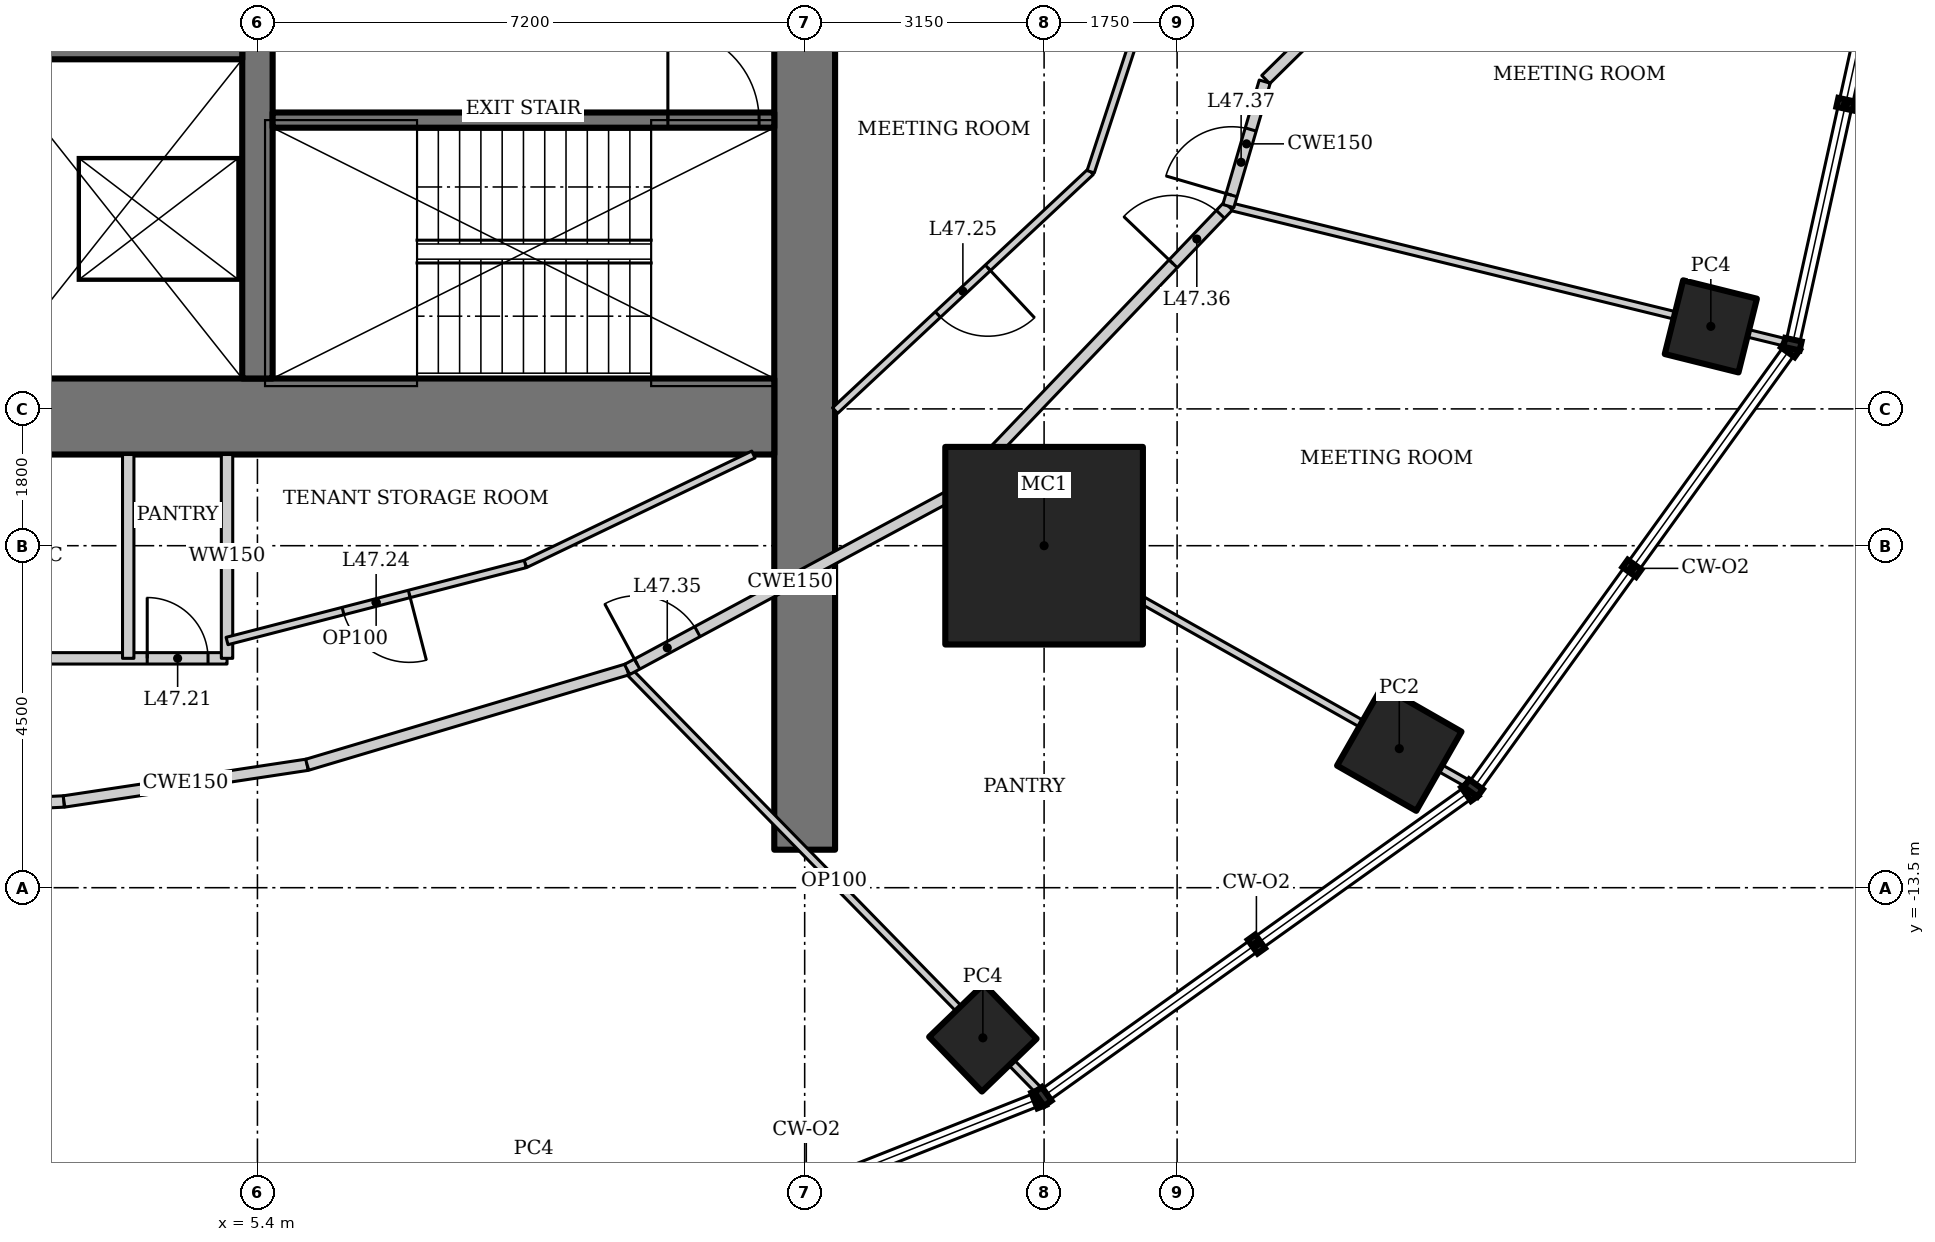
"""IFC4 building model, lengths in metres.
Left out: names, types, materials, properties, quantities, classifications, styles, units other than length and angle.
Written with IfcOpenShell. Run it as: python <this file> out.ifc"""

import sys

from ifc_helpers import new_model, si_unit, direction, frame, frame_2d, origin, origin_2d, place, context, subcontext, project, spatial, rectangle, hollow_rectangle, extrude, element, fill, save


model = new_model("IFC4")
c1 = context("Model", 3, precision=1e-05, world=origin(), true_north=direction((0.0, 1.0)))
c2 = subcontext(c1, "Body", "Model", "MODEL_VIEW")
j1 = project(units=[si_unit("LENGTHUNIT", "METRE"), si_unit("PLANEANGLEUNIT", "RADIAN")], contexts=[c1])
p1 = place(None, origin())
s1 = spatial("IfcSite", under=j1, at=p1, CompositionType="ELEMENT")
p2 = place(p1, origin())
s2 = spatial("IfcBuilding", under=s1, at=p2, CompositionType="ELEMENT")
p3 = place(p2, frame((0.0, 0.0, 203.2)))
s3 = spatial("IfcBuildingStorey", under=s2, at=p3, CompositionType="ELEMENT", Elevation=203.2)
p4 = place(p3, frame((15.75, -9.0, 0.0), z_axis=(0.0, 0.0, 1.0), x_axis=(1.0, 0.0, 0.0)))
e1 = element("IfcColumn", 1, at=p4, inside=s3, PredefinedType="COLUMN", context=c2, shape_type="SweptSolid", body=[
    extrude(hollow_rectangle(XDim=2.6, YDim=2.6, WallThickness=0.13, at=origin_2d()), origin(), (0.0, 0.0, 1.0), 4.2),
])
for number, where, z_axis, x_axis in (
    (2, (9.035, -17.731, 0.0), (0.0, 0.0, 1.0), (0.891, 0.454, 0.0)),
    (3, (14.944, -15.475, 0.0), (0.0, 0.0, 1.0), (0.719, 0.695, 0.0)),
):
    element("IfcColumn", number, at=place(p3, frame(where, z_axis=z_axis, x_axis=x_axis)), inside=s3, PredefinedType="COLUMN", context=c2, shape_type="SweptSolid", body=[
        extrude(hollow_rectangle(XDim=1.0, YDim=1.0, WallThickness=0.08, at=origin_2d()), origin(), (0.0, 0.0, 1.0), 4.2),
    ])
p5 = place(p3, frame((20.423, -11.67, 0.0), z_axis=(0.0, 0.0, 1.0), x_axis=(0.496139221777, 0.86824298017, 0.0)))
e4 = element("IfcColumn", 4, at=p5, inside=s3, PredefinedType="COLUMN", context=c2, shape_type="SweptSolid", body=[
    extrude(hollow_rectangle(XDim=1.2, YDim=1.2, WallThickness=0.1, at=origin_2d()), origin(), (0.0, 0.0, 1.0), 4.2),
])
p6 = place(p3, frame((24.522, -6.114, 0.0), z_axis=(0.0, 0.0, 1.0), x_axis=(0.2419218956, 0.970295726276, 0.0)))
e5 = element("IfcColumn", 5, at=p6, inside=s3, PredefinedType="COLUMN", context=c2, shape_type="SweptSolid", body=[
    extrude(hollow_rectangle(XDim=1.0, YDim=1.0, WallThickness=0.08, at=origin_2d()), origin(), (0.0, 0.0, 1.0), 4.2),
])
p7 = place(p3, frame((12.6, -13.0, 0.0), z_axis=(0.0, 0.0, 1.0), x_axis=(0.0, 1.0, 0.0)))
e6 = element("IfcWall", 6, at=p7, inside=s3, PredefinedType="SHEAR", context=c2, shape_type="SweptSolid", body=[
    extrude(rectangle(XDim=26.0, YDim=0.8, at=frame_2d((13.0, 0.0))), origin(), (0.0, 0.0, 1.0), 4.2),
])
p8 = place(p7, frame((12.1, 0.0, 0.0)))
e7 = element("IfcOpeningElement", 7, at=p8, cuts=e6, PredefinedType="OPENING", context=c2, shape_type="SweptSolid", body=[
    extrude(rectangle(XDim=1.8, YDim=2.1, at=frame_2d((0.9, 1.05))), frame((0.0, 0.41, 0.0), z_axis=(0.0, -1.0, 0.0), x_axis=(1.0, 0.0, 0.0)), (0.0, 0.0, 1.0), 0.82),
])
p9 = place(p3, frame((-12.2, -7.3, 0.0), z_axis=(0.0, 0.0, 1.0), x_axis=(1.0, 0.0, 0.0)))
e8 = element("IfcWall", 8, at=p9, inside=s3, PredefinedType="SHEAR", context=c2, shape_type="SweptSolid", body=[
    extrude(rectangle(XDim=24.4, YDim=1.0, at=frame_2d((12.2, 0.0))), origin(), (0.0, 0.0, 1.0), 4.2),
])
p10 = place(p3, frame((5.4, -6.8, 0.0), z_axis=(0.0, 0.0, 1.0), x_axis=(0.0, 1.0, 0.0)))
e9 = element("IfcWall", 9, at=p10, inside=s3, PredefinedType="SHEAR", context=c2, shape_type="SweptSolid", body=[
    extrude(rectangle(XDim=14.6, YDim=0.4, at=frame_2d((7.3, 0.0))), origin(), (0.0, 0.0, 1.0), 4.2),
])
p11 = place(p10, frame((5.9, 0.0, 0.0)))
e10 = element("IfcOpeningElement", 10, at=p11, cuts=e9, PredefinedType="OPENING", context=c2, shape_type="SweptSolid", body=[
    extrude(rectangle(XDim=1.8, YDim=2.1, at=frame_2d((0.9, 1.05))), frame((0.0, 0.21, 0.0), z_axis=(0.0, -1.0, 0.0), x_axis=(1.0, 0.0, 0.0)), (0.0, 0.0, 1.0), 0.42),
])
p12 = place(p3, frame((-5.2, -2.4, 0.0), z_axis=(0.0, 0.0, 1.0), x_axis=(1.0, 0.0, 0.0)))
e11 = element("IfcWall", 11, at=p12, inside=s3, PredefinedType="SHEAR", context=c2, shape_type="SweptSolid", body=[
    extrude(rectangle(XDim=10.4, YDim=0.4, at=frame_2d((5.2, 0.0))), origin(), (0.0, 0.0, 1.0), 4.2),
])
p13 = place(p12, frame((1.683, 0.0, 0.0)))
e12 = element("IfcOpeningElement", 12, at=p13, cuts=e11, PredefinedType="OPENING", context=c2, shape_type="SweptSolid", body=[
    extrude(rectangle(XDim=1.1, YDim=2.2, at=frame_2d((0.55, 1.1))), frame((0.0, 0.21, 0.0), z_axis=(0.0, -1.0, 0.0), x_axis=(1.0, 0.0, 0.0)), (0.0, 0.0, 1.0), 0.42),
])
p14 = place(p12, frame((5.217, 0.0, 0.0)))
e13 = element("IfcOpeningElement", 13, at=p14, cuts=e11, PredefinedType="OPENING", context=c2, shape_type="SweptSolid", body=[
    extrude(rectangle(XDim=1.1, YDim=2.2, at=frame_2d((0.55, 1.1))), frame((0.0, 0.21, 0.0), z_axis=(0.0, -1.0, 0.0), x_axis=(1.0, 0.0, 0.0)), (0.0, 0.0, 1.0), 0.42),
])
p15 = place(p12, frame((8.75, 0.0, 0.0)))
e14 = element("IfcOpeningElement", 14, at=p15, cuts=e11, PredefinedType="OPENING", context=c2, shape_type="SweptSolid", body=[
    extrude(rectangle(XDim=1.1, YDim=2.2, at=frame_2d((0.55, 1.1))), frame((0.0, 0.21, 0.0), z_axis=(0.0, -1.0, 0.0), x_axis=(1.0, 0.0, 0.0)), (0.0, 0.0, 1.0), 0.42),
])
p16 = place(p3, frame((5.6, -3.4, 0.0), z_axis=(0.0, 0.0, 1.0), x_axis=(1.0, 0.0, 0.0)))
e15 = element("IfcWall", 15, at=p16, inside=s3, PredefinedType="SHEAR", context=c2, shape_type="SweptSolid", body=[
    extrude(rectangle(XDim=6.6, YDim=0.2, at=frame_2d((3.3, 0.0))), origin(), (0.0, 0.0, 1.0), 4.2),
])
p17 = place(p16, frame((5.2, 0.0, 0.0)))
e16 = element("IfcOpeningElement", 16, at=p17, cuts=e15, PredefinedType="OPENING", context=c2, shape_type="SweptSolid", body=[
    extrude(rectangle(XDim=1.2, YDim=2.1, at=frame_2d((0.6, 1.05))), frame((0.0, 0.11, 0.0), z_axis=(0.0, -1.0, 0.0), x_axis=(1.0, 0.0, 0.0)), (0.0, 0.0, 1.0), 0.22),
])
p18 = place(p3, frame((15.709, -16.199, 0.0), z_axis=(0.0, 0.0, 1.0), x_axis=(-0.699053895446, 0.715068983569, 0.0)))
e17 = element("IfcWall", 17, at=p18, inside=s3, PredefinedType="PARTITIONING", context=c2, shape_type="SweptSolid", body=[
    extrude(rectangle(XDim=7.79, YDim=0.1, at=frame_2d((3.895, 0.0))), origin(), (0.0, 0.0, 1.0), 3.41),
])
p19 = place(p3, frame((21.358, -12.15, 0.0), z_axis=(0.0, 0.0, 1.0), x_axis=(-0.871273053995, 0.490798599614, 0.0)))
e18 = element("IfcWall", 18, at=p19, inside=s3, PredefinedType="PARTITIONING", context=c2, shape_type="SweptSolid", body=[
    extrude(rectangle(XDim=7.807, YDim=0.1, at=frame_2d((3.904, 0.0))), origin(), (0.0, 0.0, 1.0), 3.522),
])
p20 = place(p3, frame((25.543, -6.336, 0.0), z_axis=(0.0, 0.0, 1.0), x_axis=(-0.97130474594, 0.237838370569, 0.0)))
e19 = element("IfcWall", 19, at=p20, inside=s3, PredefinedType="PARTITIONING", context=c2, shape_type="SweptSolid", body=[
    extrude(rectangle(XDim=7.587, YDim=0.1, at=frame_2d((3.793, 0.0))), origin(), (0.0, 0.0, 1.0), 3.108),
])
p21 = place(p3, frame((0.0, -12.5, 0.0), z_axis=(0.0, 0.0, 1.0), x_axis=(0.998887574055, 0.047155216016, 0.0)))
e20 = element("IfcWall", 20, at=p21, inside=s3, PredefinedType="PARTITIONING", context=c2, shape_type="SweptSolid", body=[
    extrude(rectangle(XDim=2.858, YDim=0.15, at=frame_2d((1.429, 0.0))), origin(), (0.0, 0.0, 1.0), 4.05),
])
p22 = place(p3, frame((2.855, -12.365, 0.0), z_axis=(0.0, 0.0, 1.0), x_axis=(0.988800347251, 0.149244340852, 0.0)))
e21 = element("IfcWall", 21, at=p22, inside=s3, PredefinedType="PARTITIONING", context=c2, shape_type="SweptSolid", body=[
    extrude(rectangle(XDim=3.236, YDim=0.15, at=frame_2d((1.618, 0.0))), origin(), (0.0, 0.0, 1.0), 4.05),
])
p23 = place(p3, frame((6.054, -11.882, 0.0), z_axis=(0.0, 0.0, 1.0), x_axis=(0.958384389306, 0.285480931648, 0.0)))
e22 = element("IfcWall", 22, at=p23, inside=s3, PredefinedType="PARTITIONING", context=c2, shape_type="SweptSolid", body=[
    extrude(rectangle(XDim=4.392, YDim=0.15, at=frame_2d((2.196, 0.0))), origin(), (0.0, 0.0, 1.0), 4.05),
])
p24 = place(p3, frame((10.264, -10.628, 0.0), z_axis=(0.0, 0.0, 1.0), x_axis=(0.88053863253, 0.47397438393, 0.0)))
e23 = element("IfcWall", 23, at=p24, inside=s3, PredefinedType="PARTITIONING", context=c2, shape_type="SweptSolid", body=[
    extrude(rectangle(XDim=4.875, YDim=0.15, at=frame_2d((2.438, 0.0))), origin(), (0.0, 0.0, 1.0), 4.05),
])
p25 = place(p24, frame((0.15, 0.0, 0.0)))
e24 = element("IfcOpeningElement", 24, at=p25, cuts=e23, PredefinedType="OPENING", context=c2, shape_type="SweptSolid", body=[
    extrude(rectangle(XDim=0.9, YDim=2.1, at=frame_2d((0.45, 1.05))), frame((0.0, 0.085, 0.0), z_axis=(0.0, -1.0, 0.0), x_axis=(1.0, 0.0, 0.0)), (0.0, 0.0, 1.0), 0.17),
])
p26 = place(p3, frame((14.556, -8.318, 0.0), z_axis=(0.0, 0.0, 1.0), x_axis=(0.690768413292, 0.723076067366, 0.0)))
e25 = element("IfcWall", 25, at=p26, inside=s3, PredefinedType="PARTITIONING", context=c2, shape_type="SweptSolid", body=[
    extrude(rectangle(XDim=5.237, YDim=0.15, at=frame_2d((2.618, 0.0))), origin(), (0.0, 0.0, 1.0), 4.05),
])
p27 = place(p26, frame((4.187, 0.0, 0.0)))
e26 = element("IfcOpeningElement", 26, at=p27, cuts=e25, PredefinedType="OPENING", context=c2, shape_type="SweptSolid", body=[
    extrude(rectangle(XDim=0.9, YDim=2.1, at=frame_2d((0.45, 1.05))), frame((0.0, 0.085, 0.0), z_axis=(0.0, -1.0, 0.0), x_axis=(1.0, 0.0, 0.0)), (0.0, 0.0, 1.0), 0.17),
])
p28 = place(p3, frame((-5.0, -10.482, 0.0), z_axis=(0.0, 0.0, 1.0), x_axis=(1.0, 0.0, 0.0)))
e27 = element("IfcWall", 27, at=p28, inside=s3, PredefinedType="SOLIDWALL", context=c2, shape_type="SweptSolid", body=[
    extrude(rectangle(XDim=10.0, YDim=0.15, at=frame_2d((5.0, 0.0))), origin(), (0.0, 0.0, 1.0), 4.05),
])
p29 = place(p28, frame((0.45, 0.0, 0.0)))
e28 = element("IfcOpeningElement", 28, at=p29, cuts=e27, PredefinedType="OPENING", context=c2, shape_type="SweptSolid", body=[
    extrude(rectangle(XDim=1.0, YDim=2.1, at=frame_2d((0.5, 1.05))), frame((0.0, 0.085, 0.0), z_axis=(0.0, -1.0, 0.0), x_axis=(1.0, 0.0, 0.0)), (0.0, 0.0, 1.0), 0.17),
])
p30 = place(p28, frame((3.15, 0.0, 0.0)))
e29 = element("IfcOpeningElement", 29, at=p30, cuts=e27, PredefinedType="OPENING", context=c2, shape_type="SweptSolid", body=[
    extrude(rectangle(XDim=0.9, YDim=2.1, at=frame_2d((0.45, 1.05))), frame((0.0, 0.085, 0.0), z_axis=(0.0, -1.0, 0.0), x_axis=(1.0, 0.0, 0.0)), (0.0, 0.0, 1.0), 0.17),
])
p31 = place(p28, frame((6.55, 0.0, 0.0)))
e30 = element("IfcOpeningElement", 30, at=p31, cuts=e27, PredefinedType="OPENING", context=c2, shape_type="SweptSolid", body=[
    extrude(rectangle(XDim=0.9, YDim=2.1, at=frame_2d((0.45, 1.05))), frame((0.0, 0.085, 0.0), z_axis=(0.0, -1.0, 0.0), x_axis=(1.0, 0.0, 0.0)), (0.0, 0.0, 1.0), 0.17),
])
p32 = place(p28, frame((8.95, 0.0, 0.0)))
e31 = element("IfcOpeningElement", 31, at=p32, cuts=e27, PredefinedType="OPENING", context=c2, shape_type="SweptSolid", body=[
    extrude(rectangle(XDim=0.8, YDim=2.1, at=frame_2d((0.4, 1.05))), frame((0.0, 0.085, 0.0), z_axis=(0.0, -1.0, 0.0), x_axis=(1.0, 0.0, 0.0)), (0.0, 0.0, 1.0), 0.17),
])
for number, where, z_axis, x_axis in (
    (32, (5.0, -7.8, 0.0), (0.0, 0.0, 1.0), (0.0, -1.0, 0.0)),
    (33, (3.7, -7.8, 0.0), (0.0, 0.0, 1.0), (0.0, -1.0, 0.0)),
):
    element("IfcWall", number, at=place(p3, frame(where, z_axis=z_axis, x_axis=x_axis)), inside=s3, PredefinedType="SOLIDWALL", context=c2, shape_type="SweptSolid", body=[
        extrude(rectangle(XDim=2.682, YDim=0.15, at=frame_2d((1.341, 0.0))), origin(), (0.0, 0.0, 1.0), 4.05),
    ])
p33 = place(p3, frame((11.926, -7.8, 0.0), z_axis=(0.0, 0.0, 1.0), x_axis=(-0.901553947207, -0.432666708073, 0.0)))
e34 = element("IfcWall", 34, at=p33, inside=s3, PredefinedType="PARTITIONING", context=c2, shape_type="SweptSolid", body=[
    extrude(rectangle(XDim=3.33, YDim=0.1, at=frame_2d((1.665, 0.0))), origin(), (0.0, 0.0, 1.0), 4.05),
])
p34 = place(p3, frame((8.924, -9.241, 0.0), z_axis=(0.0, 0.0, 1.0), x_axis=(-0.968224167198, -0.250083910027, 0.0)))
e35 = element("IfcWall", 35, at=p34, inside=s3, PredefinedType="PARTITIONING", context=c2, shape_type="SweptSolid", body=[
    extrude(rectangle(XDim=4.052, YDim=0.1, at=frame_2d((2.026, 0.0))), origin(), (0.0, 0.0, 1.0), 4.05),
])
p35 = place(p34, frame((1.576, 0.0, 0.0)))
e36 = element("IfcOpeningElement", 36, at=p35, cuts=e35, PredefinedType="OPENING", context=c2, shape_type="SweptSolid", body=[
    extrude(rectangle(XDim=0.9, YDim=2.1, at=frame_2d((0.45, 1.05))), frame((0.0, 0.06, 0.0), z_axis=(0.0, -1.0, 0.0), x_axis=(1.0, 0.0, 0.0)), (0.0, 0.0, 1.0), 0.12),
])
p36 = place(p3, frame((16.363, -4.08, 0.0), z_axis=(0.0, 0.0, 1.0), x_axis=(-0.730651186567, -0.682750938167, 0.0)))
e37 = element("IfcWall", 37, at=p36, inside=s3, PredefinedType="PARTITIONING", context=c2, shape_type="SweptSolid", body=[
    extrude(rectangle(XDim=4.603, YDim=0.1, at=frame_2d((2.301, 0.0))), origin(), (0.0, 0.0, 1.0), 4.05),
])
p37 = place(p36, frame((1.851, 0.0, 0.0)))
e38 = element("IfcOpeningElement", 38, at=p37, cuts=e37, PredefinedType="OPENING", context=c2, shape_type="SweptSolid", body=[
    extrude(rectangle(XDim=0.9, YDim=2.1, at=frame_2d((0.45, 1.05))), frame((0.0, 0.06, 0.0), z_axis=(0.0, -1.0, 0.0), x_axis=(1.0, 0.0, 0.0)), (0.0, 0.0, 1.0), 0.12),
])
p38 = place(p3, frame((18.174, -4.531, 0.0), z_axis=(0.0, 0.0, 1.0), x_axis=(0.281027335084, 0.959699763955, 0.0)))
e39 = element("IfcWall", 39, at=p38, inside=s3, PredefinedType="PARTITIONING", context=c2, shape_type="SweptSolid", body=[
    extrude(rectangle(XDim=1.706, YDim=0.15, at=frame_2d((0.853, 0.0))), origin(), (0.0, 0.0, 1.0), 4.05),
])
p39 = place(p38, frame((0.15, 0.0, 0.0)))
e40 = element("IfcOpeningElement", 40, at=p39, cuts=e39, PredefinedType="OPENING", context=c2, shape_type="SweptSolid", body=[
    extrude(rectangle(XDim=0.9, YDim=2.1, at=frame_2d((0.45, 1.05))), frame((0.0, 0.085, 0.0), z_axis=(0.0, -1.0, 0.0), x_axis=(1.0, 0.0, 0.0)), (0.0, 0.0, 1.0), 0.17),
])
p40 = place(p3, frame((16.935, -2.335, 0.0), z_axis=(0.0, 0.0, 1.0), x_axis=(-0.311517212063, -0.950240509865, 0.0)))
e41 = element("IfcWall", 41, at=p40, inside=s3, PredefinedType="PARTITIONING", context=c2, shape_type="SweptSolid", body=[
    extrude(rectangle(XDim=1.836, YDim=0.1, at=frame_2d((0.918, 0.0))), origin(), (0.0, 0.0, 1.0), 4.05),
])
p41 = place(p3, frame((19.825, -1.725, 0.0), z_axis=(0.0, 0.0, 1.0), x_axis=(-0.712265481509, -0.701910167935, 0.0)))
e42 = element("IfcWall", 42, at=p41, inside=s3, PredefinedType="PARTITIONING", context=c2, shape_type="SweptSolid", body=[
    extrude(rectangle(XDim=1.627, YDim=0.15, at=frame_2d((0.813, 0.0))), origin(), (0.0, 0.0, 1.0), 4.05),
])
p42 = place(p17, origin())
e43 = element("IfcDoor", 43, at=p42, inside=s3, OperationType="SINGLE_SWING_RIGHT", PredefinedType="DOOR", context=c2, shape_type="SweptSolid", body=[
    extrude(rectangle(XDim=1.2, YDim=2.1, at=frame_2d((0.6, 1.05))), frame((0.0, 0.025, 0.0), z_axis=(0.0, -1.0, 0.0), x_axis=(1.0, 0.0, 0.0)), (0.0, 0.0, 1.0), 0.05),
])
fill(e16, e43)
p43 = place(p32, origin())
e44 = element("IfcDoor", 44, at=p43, inside=s3, OperationType="SINGLE_SWING_LEFT", PredefinedType="DOOR", context=c2, shape_type="SweptSolid", body=[
    extrude(rectangle(XDim=0.8, YDim=2.1, at=frame_2d((0.4, 1.05))), frame((0.0, 0.025, 0.0), z_axis=(0.0, -1.0, 0.0), x_axis=(1.0, 0.0, 0.0)), (0.0, 0.0, 1.0), 0.05),
])
fill(e31, e44)
p44 = place(p35, origin())
e45 = element("IfcDoor", 45, at=p44, inside=s3, OperationType="SINGLE_SWING_LEFT", PredefinedType="DOOR", context=c2, shape_type="SweptSolid", body=[
    extrude(rectangle(XDim=0.9, YDim=2.1, at=frame_2d((0.45, 1.05))), frame((0.0, 0.025, 0.0), z_axis=(0.0, -1.0, 0.0), x_axis=(1.0, 0.0, 0.0)), (0.0, 0.0, 1.0), 0.05),
])
fill(e36, e45)
p45 = place(p37, origin())
e46 = element("IfcDoor", 46, at=p45, inside=s3, OperationType="SINGLE_SWING_LEFT", PredefinedType="DOOR", context=c2, shape_type="SweptSolid", body=[
    extrude(rectangle(XDim=0.9, YDim=2.1, at=frame_2d((0.45, 1.05))), frame((0.0, 0.025, 0.0), z_axis=(0.0, -1.0, 0.0), x_axis=(1.0, 0.0, 0.0)), (0.0, 0.0, 1.0), 0.05),
])
fill(e38, e46)
p46 = place(p25, origin())
e47 = element("IfcDoor", 47, at=p46, inside=s3, OperationType="SINGLE_SWING_LEFT", PredefinedType="DOOR", context=c2, shape_type="SweptSolid", body=[
    extrude(rectangle(XDim=0.9, YDim=2.1, at=frame_2d((0.45, 1.05))), frame((0.0, 0.025, 0.0), z_axis=(0.0, -1.0, 0.0), x_axis=(1.0, 0.0, 0.0)), (0.0, 0.0, 1.0), 0.05),
])
fill(e24, e47)
p47 = place(p27, origin())
e48 = element("IfcDoor", 48, at=p47, inside=s3, OperationType="SINGLE_SWING_LEFT", PredefinedType="DOOR", context=c2, shape_type="SweptSolid", body=[
    extrude(rectangle(XDim=0.9, YDim=2.1, at=frame_2d((0.45, 1.05))), frame((0.0, 0.025, 0.0), z_axis=(0.0, -1.0, 0.0), x_axis=(1.0, 0.0, 0.0)), (0.0, 0.0, 1.0), 0.05),
])
fill(e26, e48)
p48 = place(p39, origin())
e49 = element("IfcDoor", 49, at=p48, inside=s3, OperationType="SINGLE_SWING_LEFT", PredefinedType="DOOR", context=c2, shape_type="SweptSolid", body=[
    extrude(rectangle(XDim=0.9, YDim=2.1, at=frame_2d((0.45, 1.05))), frame((0.0, 0.025, 0.0), z_axis=(0.0, -1.0, 0.0), x_axis=(1.0, 0.0, 0.0)), (0.0, 0.0, 1.0), 0.05),
])
fill(e40, e49)
save(model, sys.argv[1])
